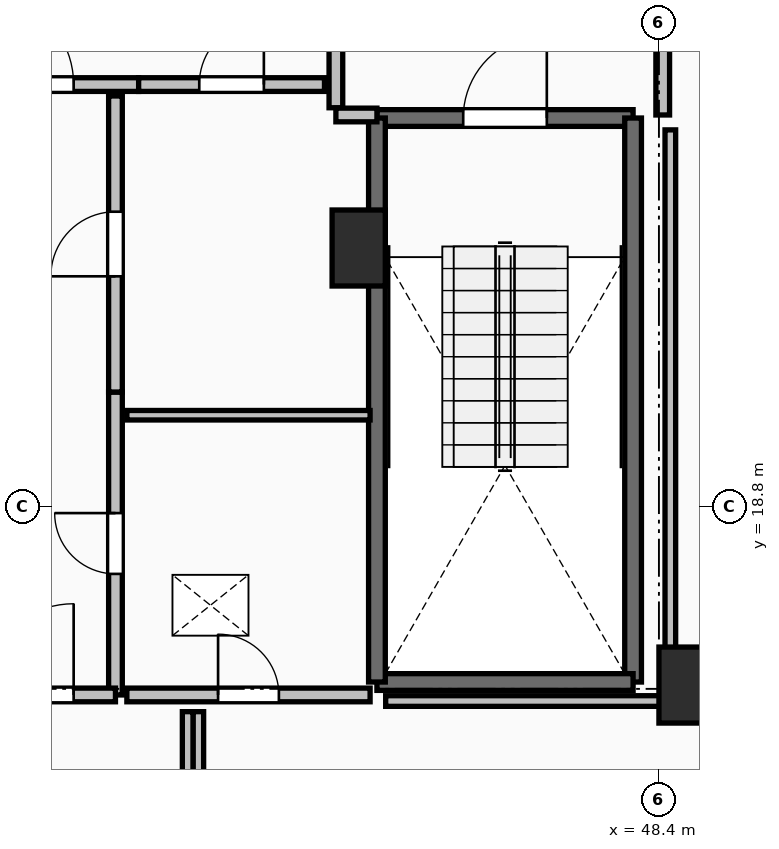
"""IFC4 building model, lengths in metres.
Left out: names, types, materials, properties, quantities, classifications, styles, units other than length and angle.
Written with IfcOpenShell. Run it as: python <this file> out.ifc"""

import sys

from ifc_helpers import new_model, si_unit, direction, frame, frame_2d, origin, origin_2d, place, context, subcontext, project, spatial, rectangle, extrude, element, fill, save


model = new_model("IFC4")
c1 = context("Model", 3, precision=1e-05, world=origin(), true_north=direction((0.0, 1.0)))
c2 = subcontext(c1, "Body", "Model", "MODEL_VIEW")
j1 = project(units=[si_unit("LENGTHUNIT", "METRE"), si_unit("PLANEANGLEUNIT", "RADIAN")], contexts=[c1])
p1 = place(None, origin())
s1 = spatial("IfcSite", under=j1, at=p1, CompositionType="ELEMENT")
p2 = place(p1, origin())
s2 = spatial("IfcBuilding", under=s1, at=p2, CompositionType="ELEMENT")
p3 = place(p2, frame((0.0, 0.0, 255.55)))
s3 = spatial("IfcBuildingStorey", under=s2, at=p3, CompositionType="ELEMENT", Elevation=255.55)
for number, where, z_axis, x_axis in (
    (1, (48.75, 16.45, 0.0), (0.0, 0.0, 1.0), (1.0, 0.0, 0.0)),
    (2, (44.45, 22.2, 0.0), (0.0, 0.0, 1.0), (1.0, 0.0, 0.0)),
):
    element("IfcColumn", number, at=place(p3, frame(where, z_axis=z_axis, x_axis=x_axis)), inside=s3, PredefinedType="PILASTER", context=c2, shape_type="SweptSolid", body=[
        extrude(rectangle(XDim=0.7, YDim=1.0, at=origin_2d()), origin(), (0.0, 0.0, 1.0), 3.55),
    ])
p4 = place(p3, frame((44.69, 23.91, 0.0), z_axis=(0.0, 0.0, 1.0), x_axis=(1.0, 0.0, 0.0)))
e3 = element("IfcWall", 3, at=p4, inside=s3, PredefinedType="SOLIDWALL", context=c2, shape_type="SweptSolid", body=[
    extrude(rectangle(XDim=3.37, YDim=0.22, at=frame_2d((1.685, 0.0))), origin(), (0.0, 0.0, 1.0), 3.29),
])
p5 = place(p4, frame((1.135, 0.0, 0.0)))
e4 = element("IfcOpeningElement", 4, at=p5, cuts=e3, PredefinedType="OPENING", context=c2, shape_type="SweptSolid", body=[
    extrude(rectangle(XDim=1.1, YDim=2.15, at=frame_2d((0.55, 1.075))), frame((0.0, 0.125, 0.0), z_axis=(0.0, -1.0, 0.0), x_axis=(1.0, 0.0, 0.0)), (0.0, 0.0, 1.0), 0.25),
])
p6 = place(p3, frame((48.06, 23.91, 0.0), z_axis=(0.0, 0.0, 1.0), x_axis=(0.0, -1.0, 0.0)))
e5 = element("IfcWall", 5, at=p6, inside=s3, PredefinedType="SOLIDWALL", context=c2, shape_type="SweptSolid", body=[
    extrude(rectangle(XDim=7.42, YDim=0.22, at=frame_2d((3.71, 0.0))), origin(), (0.0, 0.0, 1.0), 3.29),
])
p7 = place(p3, frame((48.06, 16.49, 0.0), z_axis=(0.0, 0.0, 1.0), x_axis=(-1.0, 0.0, 0.0)))
e6 = element("IfcWall", 6, at=p7, inside=s3, PredefinedType="SOLIDWALL", context=c2, shape_type="SweptSolid", body=[
    extrude(rectangle(XDim=3.37, YDim=0.22, at=frame_2d((1.685, 0.0))), origin(), (0.0, 0.0, 1.0), 3.29),
])
p8 = place(p3, frame((44.69, 16.49, 0.0), z_axis=(0.0, 0.0, 1.0), x_axis=(0.0, 1.0, 0.0)))
e7 = element("IfcWall", 7, at=p8, inside=s3, PredefinedType="SOLIDWALL", context=c2, shape_type="SweptSolid", body=[
    extrude(rectangle(XDim=7.42, YDim=0.22, at=frame_2d((3.71, 0.0))), origin(), (0.0, 0.0, 1.0), 3.29),
])
p9 = place(p3, frame((44.15, 27.955, 0.0), z_axis=(0.0, 0.0, 1.0), x_axis=(0.0, -1.0, 0.0)))
e8 = element("IfcWall", 8, at=p9, inside=s3, PredefinedType="PARTITIONING", context=c2, shape_type="SweptSolid", body=[
    extrude(rectangle(XDim=3.91, YDim=0.18, at=frame_2d((1.955, 0.0))), origin(), (0.0, 0.0, 1.0), 3.29),
])
p10 = place(p9, frame((1.355, 0.0, 0.0)))
e9 = element("IfcOpeningElement", 9, at=p10, cuts=e8, PredefinedType="OPENING", context=c2, shape_type="SweptSolid", body=[
    extrude(rectangle(XDim=1.2, YDim=2.15, at=frame_2d((0.6, 1.075))), frame((0.0, 0.105, 0.0), z_axis=(0.0, -1.0, 0.0), x_axis=(1.0, 0.0, 0.0)), (0.0, 0.0, 1.0), 0.21),
])
p11 = place(p3, frame((44.15, 23.95, 0.0), z_axis=(0.0, 0.0, 1.0), x_axis=(1.0, 0.0, 0.0)))
e10 = element("IfcWall", 10, at=p11, inside=s3, PredefinedType="PARTITIONING", context=c2, shape_type="SweptSolid", body=[
    extrude(rectangle(XDim=0.54, YDim=0.18, at=frame_2d((0.27, 0.0))), origin(), (0.0, 0.0, 1.0), 3.29),
])
p12 = place(p3, frame((48.45, 23.95, 0.0), z_axis=(0.0, 0.0, 1.0), x_axis=(0.0, 1.0, 0.0)))
e11 = element("IfcWall", 11, at=p12, inside=s3, PredefinedType="PARTITIONING", context=c2, shape_type="SweptSolid", body=[
    extrude(rectangle(XDim=4.05, YDim=0.18, at=frame_2d((2.025, 0.0))), origin(), (0.0, 0.0, 1.0), 3.29),
])
p13 = place(p12, frame((1.425, 0.0, 0.0)))
e12 = element("IfcOpeningElement", 12, at=p13, cuts=e11, PredefinedType="OPENING", context=c2, shape_type="SweptSolid", body=[
    extrude(rectangle(XDim=1.2, YDim=2.15, at=frame_2d((0.6, 1.075))), frame((0.0, 0.105, 0.0), z_axis=(0.0, -1.0, 0.0), x_axis=(1.0, 0.0, 0.0)), (0.0, 0.0, 1.0), 0.21),
])
p14 = place(p3, frame((38.645, 24.35, 0.0), z_axis=(0.0, 0.0, 1.0), x_axis=(1.0, 0.0, 0.0)))
e13 = element("IfcWall", 13, at=p14, inside=s3, PredefinedType="PARTITIONING", context=c2, shape_type="SweptSolid", body=[
    extrude(rectangle(XDim=2.91, YDim=0.18, at=frame_2d((1.455, 0.0))), origin(), (0.0, 0.0, 1.0), 3.29),
])
p15 = place(p14, frame((0.855, 0.0, 0.0)))
e14 = element("IfcOpeningElement", 14, at=p15, cuts=e13, PredefinedType="OPENING", context=c2, shape_type="SweptSolid", body=[
    extrude(rectangle(XDim=1.2, YDim=2.15, at=frame_2d((0.6, 1.075))), frame((0.0, 0.105, 0.0), z_axis=(0.0, -1.0, 0.0), x_axis=(1.0, 0.0, 0.0)), (0.0, 0.0, 1.0), 0.21),
])
p16 = place(p3, frame((41.555, 24.35, 0.0), z_axis=(0.0, 0.0, 1.0), x_axis=(1.0, 0.0, 0.0)))
e15 = element("IfcWall", 15, at=p16, inside=s3, PredefinedType="PARTITIONING", context=c2, shape_type="SweptSolid", body=[
    extrude(rectangle(XDim=2.445, YDim=0.18, at=frame_2d((1.223, 0.0))), origin(), (0.0, 0.0, 1.0), 3.29),
])
p17 = place(p16, frame((0.798, 0.0, 0.0)))
e16 = element("IfcOpeningElement", 16, at=p17, cuts=e15, PredefinedType="OPENING", context=c2, shape_type="SweptSolid", body=[
    extrude(rectangle(XDim=0.85, YDim=2.1, at=frame_2d((0.425, 1.05))), frame((0.0, 0.105, 0.0), z_axis=(0.0, -1.0, 0.0), x_axis=(1.0, 0.0, 0.0)), (0.0, 0.0, 1.0), 0.21),
])
p18 = place(p3, frame((41.25, 16.32, 0.0), z_axis=(0.0, 0.0, 1.0), x_axis=(0.0, 1.0, 0.0)))
e17 = element("IfcWall", 17, at=p18, inside=s3, PredefinedType="PARTITIONING", context=c2, shape_type="SweptSolid", body=[
    extrude(rectangle(XDim=3.985, YDim=0.18, at=frame_2d((1.992, 0.0))), origin(), (0.0, 0.0, 1.0), 3.29),
])
p19 = place(p18, frame((1.593, 0.0, 0.0)))
e18 = element("IfcOpeningElement", 18, at=p19, cuts=e17, PredefinedType="OPENING", context=c2, shape_type="SweptSolid", body=[
    extrude(rectangle(XDim=0.8, YDim=2.05, at=frame_2d((0.4, 1.025))), frame((0.0, 0.105, 0.0), z_axis=(0.0, -1.0, 0.0), x_axis=(1.0, 0.0, 0.0)), (0.0, 0.0, 1.0), 0.21),
])
p20 = place(p3, frame((41.25, 20.305, 0.0), z_axis=(0.0, 0.0, 1.0), x_axis=(0.0, 1.0, 0.0)))
e19 = element("IfcWall", 19, at=p20, inside=s3, PredefinedType="PARTITIONING", context=c2, shape_type="SweptSolid", body=[
    extrude(rectangle(XDim=3.895, YDim=0.18, at=frame_2d((1.948, 0.0))), origin(), (0.0, 0.0, 1.0), 2.482),
])
p21 = place(p20, frame((1.522, 0.0, 0.0)))
e20 = element("IfcOpeningElement", 20, at=p21, cuts=e19, PredefinedType="OPENING", context=c2, shape_type="SweptSolid", body=[
    extrude(rectangle(XDim=0.85, YDim=2.1, at=frame_2d((0.425, 1.05))), frame((0.0, 0.105, 0.0), z_axis=(0.0, -1.0, 0.0), x_axis=(1.0, 0.0, 0.0)), (0.0, 0.0, 1.0), 0.21),
])
p22 = place(p3, frame((38.95, 16.32, 0.0), z_axis=(0.0, 0.0, 1.0), x_axis=(1.0, 0.0, 0.0)))
e21 = element("IfcWall", 21, at=p22, inside=s3, PredefinedType="PARTITIONING", context=c2, shape_type="SweptSolid", body=[
    extrude(rectangle(XDim=2.3, YDim=0.18, at=frame_2d((1.15, 0.0))), origin(), (0.0, 0.0, 1.0), 3.29),
])
p23 = place(p22, frame((0.55, 0.0, 0.0)))
e22 = element("IfcOpeningElement", 22, at=p23, cuts=e21, PredefinedType="OPENING", context=c2, shape_type="SweptSolid", body=[
    extrude(rectangle(XDim=1.2, YDim=2.15, at=frame_2d((0.6, 1.075))), frame((0.0, 0.105, 0.0), z_axis=(0.0, -1.0, 0.0), x_axis=(1.0, 0.0, 0.0)), (0.0, 0.0, 1.0), 0.21),
])
p24 = place(p3, frame((44.6, 20.0, 0.0), z_axis=(0.0, 0.0, 1.0), x_axis=(-1.0, 0.0, 0.0)))
e23 = element("IfcWall", 23, at=p24, inside=s3, PredefinedType="PARTITIONING", context=c2, shape_type="SweptSolid", body=[
    extrude(rectangle(XDim=3.2, YDim=0.125, at=frame_2d((1.6, 0.0))), origin(), (0.0, 0.0, 1.0), 3.29),
])
p25 = place(p3, frame((41.4, 16.32, 0.0), z_axis=(0.0, 0.0, 1.0), x_axis=(1.0, 0.0, 0.0)))
e24 = element("IfcWall", 24, at=p25, inside=s3, PredefinedType="PARTITIONING", context=c2, shape_type="SweptSolid", body=[
    extrude(rectangle(XDim=3.2, YDim=0.18, at=frame_2d((1.6, 0.0))), origin(), (0.0, 0.0, 1.0), 3.29),
])
p26 = place(p25, frame((1.2, 0.0, 0.0)))
e25 = element("IfcOpeningElement", 25, at=p26, cuts=e24, PredefinedType="OPENING", context=c2, shape_type="SweptSolid", body=[
    extrude(rectangle(XDim=0.8, YDim=2.05, at=frame_2d((0.4, 1.025))), frame((0.0, 0.105, 0.0), z_axis=(0.0, -1.0, 0.0), x_axis=(1.0, 0.0, 0.0)), (0.0, 0.0, 1.0), 0.21),
])
p27 = place(p3, frame((42.34, 14.25, 0.0), z_axis=(0.0, 0.0, 1.0), x_axis=(0.0, 1.0, 0.0)))
e26 = element("IfcWall", 26, at=p27, inside=s3, PredefinedType="PARTITIONING", context=c2, shape_type="SweptSolid", body=[
    extrude(rectangle(XDim=1.85, YDim=0.14, at=frame_2d((0.925, 0.0))), origin(), (0.0, 0.0, 1.0), 3.29),
])
p28 = place(p3, frame((44.805, 16.24, 0.0), z_axis=(0.0, 0.0, 1.0), x_axis=(1.0, 0.0, 0.0)))
e27 = element("IfcWall", 27, at=p28, inside=s3, PredefinedType="PARTITIONING", context=c2, shape_type="SweptSolid", body=[
    extrude(rectangle(XDim=3.745, YDim=0.14, at=frame_2d((1.873, 0.0))), origin(), (0.0, 0.0, 1.0), 2.482),
])
p29 = place(p3, frame((48.55, 16.24, 0.0), z_axis=(0.0, 0.0, 1.0), x_axis=(0.0, 1.0, 0.0)))
e28 = element("IfcWall", 28, at=p29, inside=s3, PredefinedType="PARTITIONING", context=c2, shape_type="SweptSolid", body=[
    extrude(rectangle(XDim=7.514, YDim=0.14, at=frame_2d((3.757, 0.0))), origin(), (0.0, 0.0, 1.0), 2.482),
])
p30 = place(p3, frame((42.2, 16.1, 0.0), z_axis=(0.0, 0.0, 1.0), x_axis=(0.0, -1.0, 0.0)))
e29 = element("IfcWall", 29, at=p30, inside=s3, PredefinedType="PARTITIONING", context=c2, shape_type="SweptSolid", body=[
    extrude(rectangle(XDim=1.85, YDim=0.14, at=frame_2d((0.925, 0.0))), origin(), (0.0, 0.0, 1.0), 3.29),
])
p31 = place(p5, origin())
e30 = element("IfcDoor", 30, at=p31, inside=s3, OperationType="SINGLE_SWING_RIGHT", PredefinedType="DOOR", context=c2, shape_type="SweptSolid", body=[
    extrude(rectangle(XDim=1.1, YDim=2.15, at=frame_2d((0.55, 1.075))), frame((0.0, 0.025, 0.0), z_axis=(0.0, -1.0, 0.0), x_axis=(1.0, 0.0, 0.0)), (0.0, 0.0, 1.0), 0.05),
])
fill(e4, e30)
p32 = place(p15, origin())
e31 = element("IfcDoor", 31, at=p32, inside=s3, OperationType="SINGLE_SWING_LEFT", PredefinedType="DOOR", context=c2, shape_type="SweptSolid", body=[
    extrude(rectangle(XDim=1.2, YDim=2.15, at=frame_2d((0.6, 1.075))), frame((0.0, 0.025, 0.0), z_axis=(0.0, -1.0, 0.0), x_axis=(1.0, 0.0, 0.0)), (0.0, 0.0, 1.0), 0.05),
])
fill(e14, e31)
p33 = place(p17, origin())
e32 = element("IfcDoor", 32, at=p33, inside=s3, OperationType="SINGLE_SWING_RIGHT", PredefinedType="DOOR", context=c2, shape_type="SweptSolid", body=[
    extrude(rectangle(XDim=0.85, YDim=2.1, at=frame_2d((0.425, 1.05))), frame((0.0, 0.025, 0.0), z_axis=(0.0, -1.0, 0.0), x_axis=(1.0, 0.0, 0.0)), (0.0, 0.0, 1.0), 0.05),
])
fill(e16, e32)
p34 = place(p19, origin())
e33 = element("IfcDoor", 33, at=p34, inside=s3, OperationType="SINGLE_SWING_RIGHT", PredefinedType="DOOR", context=c2, shape_type="SweptSolid", body=[
    extrude(rectangle(XDim=0.8, YDim=2.05, at=frame_2d((0.4, 1.025))), frame((0.0, 0.025, 0.0), z_axis=(0.0, -1.0, 0.0), x_axis=(1.0, 0.0, 0.0)), (0.0, 0.0, 1.0), 0.05),
])
fill(e18, e33)
p35 = place(p21, origin())
e34 = element("IfcDoor", 34, at=p35, inside=s3, OperationType="SINGLE_SWING_LEFT", PredefinedType="DOOR", context=c2, shape_type="SweptSolid", body=[
    extrude(rectangle(XDim=0.85, YDim=2.1, at=frame_2d((0.425, 1.05))), frame((0.0, 0.025, 0.0), z_axis=(0.0, -1.0, 0.0), x_axis=(1.0, 0.0, 0.0)), (0.0, 0.0, 1.0), 0.05),
])
fill(e20, e34)
p36 = place(p23, origin())
e35 = element("IfcDoor", 35, at=p36, inside=s3, OperationType="SINGLE_SWING_RIGHT", PredefinedType="DOOR", context=c2, shape_type="SweptSolid", body=[
    extrude(rectangle(XDim=1.2, YDim=2.15, at=frame_2d((0.6, 1.075))), frame((0.0, 0.025, 0.0), z_axis=(0.0, -1.0, 0.0), x_axis=(1.0, 0.0, 0.0)), (0.0, 0.0, 1.0), 0.05),
])
fill(e22, e35)
p37 = place(p26, origin())
e36 = element("IfcDoor", 36, at=p37, inside=s3, OperationType="SINGLE_SWING_LEFT", PredefinedType="DOOR", context=c2, shape_type="SweptSolid", body=[
    extrude(rectangle(XDim=0.8, YDim=2.05, at=frame_2d((0.4, 1.025))), frame((0.0, 0.025, 0.0), z_axis=(0.0, -1.0, 0.0), x_axis=(1.0, 0.0, 0.0)), (0.0, 0.0, 1.0), 0.05),
])
fill(e25, e36)
save(model, sys.argv[1])
